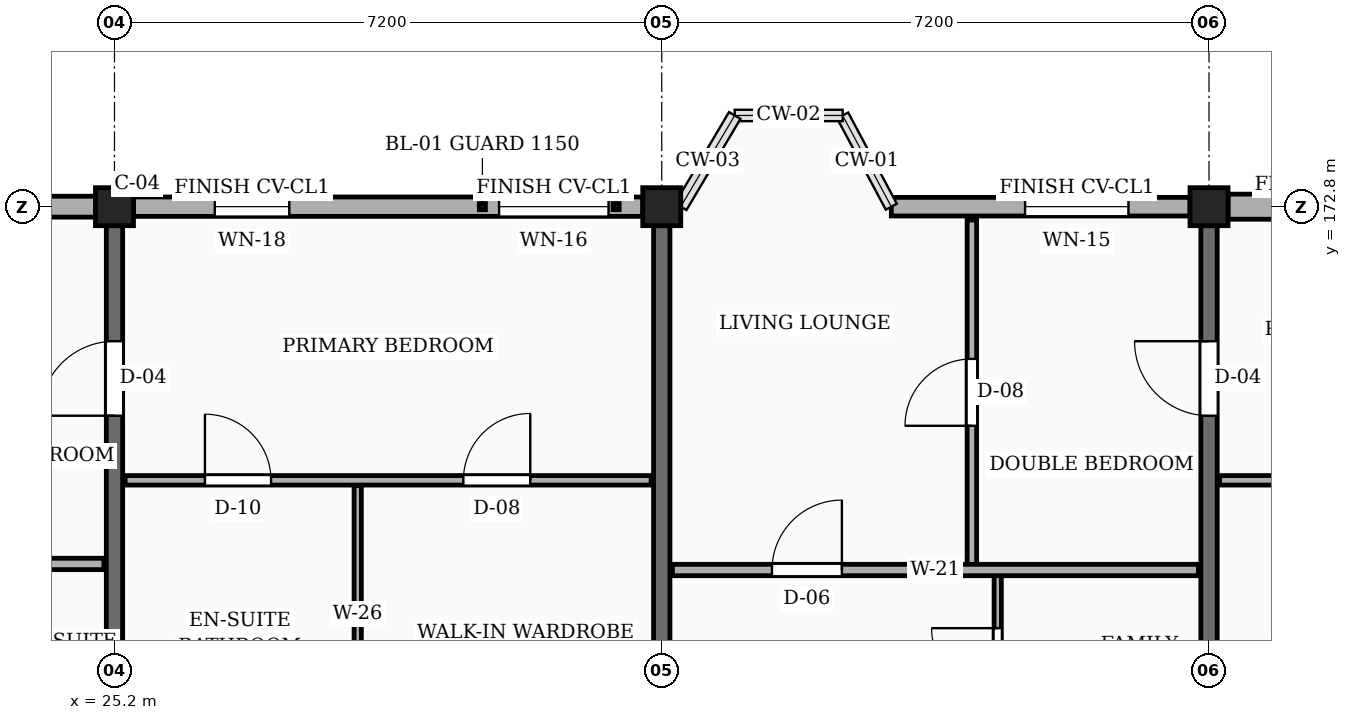
"""IFC4 building model, lengths in metres.
Left out: names, types, materials, properties, quantities, classifications, styles, units other than length and angle.
Written with IfcOpenShell. Run it as: python <this file> out.ifc"""

import sys

from ifc_helpers import new_model, si_unit, direction, frame, frame_2d, origin, origin_2d, place, context, subcontext, project, spatial, rectangle, extrude, element, fill, save


model = new_model("IFC4")
c1 = context("Model", 3, precision=1e-05, world=origin(), true_north=direction((0.0, 1.0)))
c2 = subcontext(c1, "Body", "Model", "MODEL_VIEW")
j1 = project(units=[si_unit("LENGTHUNIT", "METRE"), si_unit("PLANEANGLEUNIT", "RADIAN")], contexts=[c1])
p1 = place(None, origin())
s1 = spatial("IfcSite", under=j1, at=p1, CompositionType="ELEMENT")
p2 = place(p1, origin())
s2 = spatial("IfcBuilding", under=s1, at=p2, CompositionType="ELEMENT")
p3 = place(p2, frame((0.0, 0.0, 32.85)))
s3 = spatial("IfcBuildingStorey", under=s2, at=p3, CompositionType="ELEMENT", Elevation=32.85)
for number, where, z_axis, x_axis in (
    (1, (25.2, 172.8, 0.0), (0.0, 0.0, 1.0), (1.0, 0.0, 0.0)),
    (2, (32.4, 172.8, 0.0), (0.0, 0.0, 1.0), (1.0, 0.0, 0.0)),
    (3, (39.6, 172.8, 0.0), (0.0, 0.0, 1.0), (1.0, 0.0, 0.0)),
):
    element("IfcColumn", number, at=place(p3, frame(where, z_axis=z_axis, x_axis=x_axis)), inside=s3, PredefinedType="COLUMN", context=c2, shape_type="SweptSolid", body=[
        extrude(rectangle(XDim=0.5, YDim=0.5, at=origin_2d()), origin(), (0.0, 0.0, 1.0), 3.15),
    ])
p4 = place(p3, frame((25.2, 165.9, 0.0), z_axis=(0.0, 0.0, 1.0), x_axis=(0.0, 1.0, 0.0)))
e4 = element("IfcWall", 4, at=p4, inside=s3, PredefinedType="SOLIDWALL", context=c2, shape_type="SweptSolid", body=[
    extrude(rectangle(XDim=6.65, YDim=0.215, at=frame_2d((3.325, 0.0))), origin(), (0.0, 0.0, 1.0), 2.185),
])
p5 = place(p4, frame((4.15, 0.0, 0.0)))
e5 = element("IfcOpeningElement", 5, at=p5, cuts=e4, PredefinedType="OPENING", context=c2, shape_type="SweptSolid", body=[
    extrude(rectangle(XDim=0.98, YDim=2.12, at=frame_2d((0.49, 1.06))), frame((0.0, 0.118, 0.0), z_axis=(0.0, -1.0, 0.0), x_axis=(1.0, 0.0, 0.0)), (0.0, 0.0, 1.0), 0.235),
])
p6 = place(p3, frame((32.4, 165.9, 0.0), z_axis=(0.0, 0.0, 1.0), x_axis=(0.0, 1.0, 0.0)))
e6 = element("IfcWall", 6, at=p6, inside=s3, PredefinedType="SOLIDWALL", context=c2, shape_type="SweptSolid", body=[
    extrude(rectangle(XDim=6.65, YDim=0.215, at=frame_2d((3.325, 0.0))), origin(), (0.0, 0.0, 1.0), 2.185),
])
p7 = place(p3, frame((39.6, 165.9, 0.0), z_axis=(0.0, 0.0, 1.0), x_axis=(0.0, 1.0, 0.0)))
e7 = element("IfcWall", 7, at=p7, inside=s3, PredefinedType="SOLIDWALL", context=c2, shape_type="SweptSolid", body=[
    extrude(rectangle(XDim=6.65, YDim=0.215, at=frame_2d((3.325, 0.0))), origin(), (0.0, 0.0, 1.0), 2.185),
])
p8 = place(p7, frame((4.15, 0.0, 0.0)))
e8 = element("IfcOpeningElement", 8, at=p8, cuts=e7, PredefinedType="OPENING", context=c2, shape_type="SweptSolid", body=[
    extrude(rectangle(XDim=0.98, YDim=2.12, at=frame_2d((0.49, 1.06))), frame((0.0, 0.118, 0.0), z_axis=(0.0, -1.0, 0.0), x_axis=(1.0, 0.0, 0.0)), (0.0, 0.0, 1.0), 0.235),
])
p9 = place(p3, frame((46.55, 172.8, 0.0), z_axis=(0.0, 0.0, 1.0), x_axis=(-1.0, 0.0, 0.0)))
e9 = element("IfcWall", 9, at=p9, inside=s3, PredefinedType="SOLIDWALL", context=c2, shape_type="SweptSolid", body=[
    extrude(rectangle(XDim=6.7, YDim=0.33, at=frame_2d((3.35, 0.0))), origin(), (0.0, 0.0, 1.0), 2.455),
])
p10 = place(p9, frame((0.45, 0.0, 0.78)))
e10 = element("IfcOpeningElement", 10, at=p10, cuts=e9, PredefinedType="OPENING", context=c2, shape_type="SweptSolid", body=[
    extrude(rectangle(XDim=1.2, YDim=1.26, at=frame_2d((0.6, 0.63))), frame((0.0, 0.175, 0.0), z_axis=(0.0, -1.0, 0.0), x_axis=(1.0, 0.0, 0.0)), (0.0, 0.0, 1.0), 0.35),
])
p11 = place(p9, frame((4.65, 0.0, 0.78)))
e11 = element("IfcOpeningElement", 11, at=p11, cuts=e9, PredefinedType="OPENING", context=c2, shape_type="SweptSolid", body=[
    extrude(rectangle(XDim=1.36, YDim=1.26, at=frame_2d((0.68, 0.63))), frame((0.0, 0.175, 0.0), z_axis=(0.0, -1.0, 0.0), x_axis=(1.0, 0.0, 0.0)), (0.0, 0.0, 1.0), 0.35),
])
p12 = place(p3, frame((39.35, 172.8, 0.0), z_axis=(0.0, 0.0, 1.0), x_axis=(-1.0, 0.0, 0.0)))
e12 = element("IfcWall", 12, at=p12, inside=s3, PredefinedType="SOLIDWALL", context=c2, shape_type="SweptSolid", body=[
    extrude(rectangle(XDim=3.93, YDim=0.245, at=frame_2d((1.965, 0.0))), origin(), (0.0, 0.0, 1.0), 2.455),
])
p13 = place(p12, frame((0.81, 0.0, 0.78)))
e13 = element("IfcOpeningElement", 13, at=p13, cuts=e12, PredefinedType="OPENING", context=c2, shape_type="SweptSolid", body=[
    extrude(rectangle(XDim=1.36, YDim=1.26, at=frame_2d((0.68, 0.63))), frame((0.0, 0.133, 0.0), z_axis=(0.0, -1.0, 0.0), x_axis=(1.0, 0.0, 0.0)), (0.0, 0.0, 1.0), 0.265),
])
p14 = place(p3, frame((32.15, 172.8, 0.0), z_axis=(0.0, 0.0, 1.0), x_axis=(-1.0, 0.0, 0.0)))
e14 = element("IfcWall", 14, at=p14, inside=s3, PredefinedType="SOLIDWALL", context=c2, shape_type="SweptSolid", body=[
    extrude(rectangle(XDim=6.7, YDim=0.255, at=frame_2d((3.35, 0.0))), origin(), (0.0, 0.0, 1.0), 2.455),
])
p15 = place(p14, frame((0.45, 0.0, 0.78)))
e15 = element("IfcOpeningElement", 15, at=p15, cuts=e14, PredefinedType="OPENING", context=c2, shape_type="SweptSolid", body=[
    extrude(rectangle(XDim=1.44, YDim=1.26, at=frame_2d((0.72, 0.63))), frame((0.0, 0.137, 0.0), z_axis=(0.0, -1.0, 0.0), x_axis=(1.0, 0.0, 0.0)), (0.0, 0.0, 1.0), 0.275),
])
p16 = place(p14, frame((4.65, 0.0, 0.78)))
e16 = element("IfcOpeningElement", 16, at=p16, cuts=e14, PredefinedType="OPENING", context=c2, shape_type="SweptSolid", body=[
    extrude(rectangle(XDim=0.98, YDim=1.36, at=frame_2d((0.49, 0.68))), frame((0.0, 0.137, 0.0), z_axis=(0.0, -1.0, 0.0), x_axis=(1.0, 0.0, 0.0)), (0.0, 0.0, 1.0), 0.275),
])
p17 = place(p3, frame((24.95, 172.8, 0.0), z_axis=(0.0, 0.0, 1.0), x_axis=(-1.0, 0.0, 0.0)))
e17 = element("IfcWall", 17, at=p17, inside=s3, PredefinedType="SOLIDWALL", context=c2, shape_type="SweptSolid", body=[
    extrude(rectangle(XDim=3.93, YDim=0.275, at=frame_2d((1.965, 0.0))), origin(), (0.0, 0.0, 1.0), 2.455),
])
p18 = place(p17, frame((1.14, 0.0, 0.78)))
e18 = element("IfcOpeningElement", 18, at=p18, cuts=e17, PredefinedType="OPENING", context=c2, shape_type="SweptSolid", body=[
    extrude(rectangle(XDim=0.98, YDim=1.36, at=frame_2d((0.49, 0.68))), frame((0.0, 0.147, 0.0), z_axis=(0.0, -1.0, 0.0), x_axis=(1.0, 0.0, 0.0)), (0.0, 0.0, 1.0), 0.295),
])
p19 = place(p3, frame((18.14, 168.1, 0.0), z_axis=(0.0, 0.0, 1.0), x_axis=(1.0, 0.0, 0.0)))
e19 = element("IfcWall", 19, at=p19, inside=s3, PredefinedType="PARTITIONING", context=c2, shape_type="SweptSolid", body=[
    extrude(rectangle(XDim=6.92, YDim=0.15, at=frame_2d((3.46, 0.0))), origin(), (0.0, 0.0, 1.0), 2.32),
])
p20 = place(p19, frame((1.31, 0.0, 0.0)))
e20 = element("IfcOpeningElement", 20, at=p20, cuts=e19, PredefinedType="OPENING", context=c2, shape_type="SweptSolid", body=[
    extrude(rectangle(XDim=0.95, YDim=2.1, at=frame_2d((0.475, 1.05))), frame((0.0, 0.085, 0.0), z_axis=(0.0, -1.0, 0.0), x_axis=(1.0, 0.0, 0.0)), (0.0, 0.0, 1.0), 0.17),
])
p21 = place(p3, frame((25.34, 169.2, 0.0), z_axis=(0.0, 0.0, 1.0), x_axis=(1.0, 0.0, 0.0)))
e21 = element("IfcWall", 21, at=p21, inside=s3, PredefinedType="PARTITIONING", context=c2, shape_type="SweptSolid", body=[
    extrude(rectangle(XDim=6.92, YDim=0.125, at=frame_2d((3.46, 0.0))), origin(), (0.0, 0.0, 1.0), 2.32),
])
p22 = place(p21, frame((1.05, 0.0, 0.0)))
e22 = element("IfcOpeningElement", 22, at=p22, cuts=e21, PredefinedType="OPENING", context=c2, shape_type="SweptSolid", body=[
    extrude(rectangle(XDim=0.87, YDim=2.05, at=frame_2d((0.435, 1.025))), frame((0.0, 0.073, 0.0), z_axis=(0.0, -1.0, 0.0), x_axis=(1.0, 0.0, 0.0)), (0.0, 0.0, 1.0), 0.145),
])
p23 = place(p21, frame((4.45, 0.0, 0.0)))
e23 = element("IfcOpeningElement", 23, at=p23, cuts=e21, PredefinedType="OPENING", context=c2, shape_type="SweptSolid", body=[
    extrude(rectangle(XDim=0.88, YDim=2.08, at=frame_2d((0.44, 1.04))), frame((0.0, 0.073, 0.0), z_axis=(0.0, -1.0, 0.0), x_axis=(1.0, 0.0, 0.0)), (0.0, 0.0, 1.0), 0.145),
])
p24 = place(p3, frame((28.4, 165.74, 0.0), z_axis=(0.0, 0.0, 1.0), x_axis=(0.0, 1.0, 0.0)))
e24 = element("IfcWall", 24, at=p24, inside=s3, PredefinedType="PARTITIONING", context=c2, shape_type="SweptSolid", body=[
    extrude(rectangle(XDim=3.39, YDim=0.095, at=frame_2d((1.695, 0.0))), origin(), (0.0, 0.0, 1.0), 2.32),
])
p25 = place(p3, frame((36.48, 168.09, 0.0), z_axis=(0.0, 0.0, 1.0), x_axis=(0.0, 1.0, 0.0)))
e25 = element("IfcWall", 25, at=p25, inside=s3, PredefinedType="PARTITIONING", context=c2, shape_type="SweptSolid", body=[
    extrude(rectangle(XDim=4.535, YDim=0.125, at=frame_2d((2.268, 0.0))), origin(), (0.0, 0.0, 1.0), 2.32),
])
p26 = place(p25, frame((1.827, 0.0, 0.0)))
e26 = element("IfcOpeningElement", 26, at=p26, cuts=e25, PredefinedType="OPENING", context=c2, shape_type="SweptSolid", body=[
    extrude(rectangle(XDim=0.88, YDim=2.08, at=frame_2d((0.44, 1.04))), frame((0.0, 0.073, 0.0), z_axis=(0.0, -1.0, 0.0), x_axis=(1.0, 0.0, 0.0)), (0.0, 0.0, 1.0), 0.145),
])
p27 = place(p3, frame((36.82, 165.69, 0.0), z_axis=(0.0, 0.0, 1.0), x_axis=(0.0, 1.0, 0.0)))
e27 = element("IfcWall", 27, at=p27, inside=s3, PredefinedType="PARTITIONING", context=c2, shape_type="SweptSolid", body=[
    extrude(rectangle(XDim=2.26, YDim=0.095, at=frame_2d((1.13, 0.0))), origin(), (0.0, 0.0, 1.0), 2.32),
])
p28 = place(p27, frame((0.695, 0.0, 0.0)))
e28 = element("IfcOpeningElement", 28, at=p28, cuts=e27, PredefinedType="OPENING", context=c2, shape_type="SweptSolid", body=[
    extrude(rectangle(XDim=0.87, YDim=2.05, at=frame_2d((0.435, 1.025))), frame((0.0, 0.058, 0.0), z_axis=(0.0, -1.0, 0.0), x_axis=(1.0, 0.0, 0.0)), (0.0, 0.0, 1.0), 0.115),
])
p29 = place(p3, frame((32.54, 168.02, 0.0), z_axis=(0.0, 0.0, 1.0), x_axis=(1.0, 0.0, 0.0)))
e29 = element("IfcWall", 29, at=p29, inside=s3, PredefinedType="PARTITIONING", context=c2, shape_type="SweptSolid", body=[
    extrude(rectangle(XDim=6.92, YDim=0.15, at=frame_2d((3.46, 0.0))), origin(), (0.0, 0.0, 1.0), 2.32),
])
p30 = place(p29, frame((1.31, 0.0, 0.0)))
e30 = element("IfcOpeningElement", 30, at=p30, cuts=e29, PredefinedType="OPENING", context=c2, shape_type="SweptSolid", body=[
    extrude(rectangle(XDim=0.92, YDim=2.1, at=frame_2d((0.46, 1.05))), frame((0.0, 0.085, 0.0), z_axis=(0.0, -1.0, 0.0), x_axis=(1.0, 0.0, 0.0)), (0.0, 0.0, 1.0), 0.17),
])
p31 = place(p3, frame((39.74, 169.2, 0.0), z_axis=(0.0, 0.0, 1.0), x_axis=(1.0, 0.0, 0.0)))
e31 = element("IfcWall", 31, at=p31, inside=s3, PredefinedType="PARTITIONING", context=c2, shape_type="SweptSolid", body=[
    extrude(rectangle(XDim=6.92, YDim=0.125, at=frame_2d((3.46, 0.0))), origin(), (0.0, 0.0, 1.0), 2.32),
])
p32 = place(p31, frame((1.05, 0.0, 0.0)))
e32 = element("IfcOpeningElement", 32, at=p32, cuts=e31, PredefinedType="OPENING", context=c2, shape_type="SweptSolid", body=[
    extrude(rectangle(XDim=0.87, YDim=2.05, at=frame_2d((0.435, 1.025))), frame((0.0, 0.073, 0.0), z_axis=(0.0, -1.0, 0.0), x_axis=(1.0, 0.0, 0.0)), (0.0, 0.0, 1.0), 0.145),
])
p33 = place(p31, frame((4.45, 0.0, 0.0)))
e33 = element("IfcOpeningElement", 33, at=p33, cuts=e31, PredefinedType="OPENING", context=c2, shape_type="SweptSolid", body=[
    extrude(rectangle(XDim=0.88, YDim=2.08, at=frame_2d((0.44, 1.04))), frame((0.0, 0.073, 0.0), z_axis=(0.0, -1.0, 0.0), x_axis=(1.0, 0.0, 0.0)), (0.0, 0.0, 1.0), 0.145),
])
p34 = place(p13, origin())
e34 = element("IfcWindow", 34, at=p34, inside=s3, PartitioningType="SINGLE_PANEL", PredefinedType="WINDOW", context=c2, shape_type="SweptSolid", body=[
    extrude(rectangle(XDim=1.36, YDim=1.26, at=frame_2d((0.68, 0.63))), frame((0.0, 0.03, 0.0), z_axis=(0.0, -1.0, 0.0), x_axis=(1.0, 0.0, 0.0)), (0.0, 0.0, 1.0), 0.06),
])
fill(e13, e34)
p35 = place(p15, origin())
e35 = element("IfcWindow", 35, at=p35, inside=s3, PartitioningType="SINGLE_PANEL", PredefinedType="WINDOW", context=c2, shape_type="SweptSolid", body=[
    extrude(rectangle(XDim=1.44, YDim=1.26, at=frame_2d((0.72, 0.63))), frame((0.0, 0.03, 0.0), z_axis=(0.0, -1.0, 0.0), x_axis=(1.0, 0.0, 0.0)), (0.0, 0.0, 1.0), 0.06),
])
fill(e15, e35)
p36 = place(p16, origin())
e36 = element("IfcWindow", 36, at=p36, inside=s3, PartitioningType="SINGLE_PANEL", PredefinedType="WINDOW", context=c2, shape_type="SweptSolid", body=[
    extrude(rectangle(XDim=0.98, YDim=1.36, at=frame_2d((0.49, 0.68))), frame((0.0, 0.03, 0.0), z_axis=(0.0, -1.0, 0.0), x_axis=(1.0, 0.0, 0.0)), (0.0, 0.0, 1.0), 0.06),
])
fill(e16, e36)
p37 = place(p22, origin())
e37 = element("IfcDoor", 37, at=p37, inside=s3, OperationType="SINGLE_SWING_LEFT", PredefinedType="DOOR", context=c2, shape_type="SweptSolid", body=[
    extrude(rectangle(XDim=0.87, YDim=2.05, at=frame_2d((0.435, 1.025))), frame((0.0, 0.025, 0.0), z_axis=(0.0, -1.0, 0.0), x_axis=(1.0, 0.0, 0.0)), (0.0, 0.0, 1.0), 0.05),
])
fill(e22, e37)
p38 = place(p23, origin())
e38 = element("IfcDoor", 38, at=p38, inside=s3, OperationType="SINGLE_SWING_RIGHT", PredefinedType="DOOR", context=c2, shape_type="SweptSolid", body=[
    extrude(rectangle(XDim=0.88, YDim=2.08, at=frame_2d((0.44, 1.04))), frame((0.0, 0.025, 0.0), z_axis=(0.0, -1.0, 0.0), x_axis=(1.0, 0.0, 0.0)), (0.0, 0.0, 1.0), 0.05),
])
fill(e23, e38)
p39 = place(p26, origin())
e39 = element("IfcDoor", 39, at=p39, inside=s3, OperationType="SINGLE_SWING_LEFT", PredefinedType="DOOR", context=c2, shape_type="SweptSolid", body=[
    extrude(rectangle(XDim=0.88, YDim=2.08, at=frame_2d((0.44, 1.04))), frame((0.0, 0.025, 0.0), z_axis=(0.0, -1.0, 0.0), x_axis=(1.0, 0.0, 0.0)), (0.0, 0.0, 1.0), 0.05),
])
fill(e26, e39)
p40 = place(p28, origin())
e40 = element("IfcDoor", 40, at=p40, inside=s3, OperationType="SINGLE_SWING_RIGHT", PredefinedType="DOOR", context=c2, shape_type="SweptSolid", body=[
    extrude(rectangle(XDim=0.87, YDim=2.05, at=frame_2d((0.435, 1.025))), frame((0.0, 0.025, 0.0), z_axis=(0.0, -1.0, 0.0), x_axis=(1.0, 0.0, 0.0)), (0.0, 0.0, 1.0), 0.05),
])
fill(e28, e40)
p41 = place(p30, origin())
e41 = element("IfcDoor", 41, at=p41, inside=s3, OperationType="SINGLE_SWING_RIGHT", PredefinedType="DOOR", context=c2, shape_type="SweptSolid", body=[
    extrude(rectangle(XDim=0.92, YDim=2.1, at=frame_2d((0.46, 1.05))), frame((0.0, 0.025, 0.0), z_axis=(0.0, -1.0, 0.0), x_axis=(1.0, 0.0, 0.0)), (0.0, 0.0, 1.0), 0.05),
])
fill(e30, e41)
p42 = place(p5, origin())
e42 = element("IfcDoor", 42, at=p42, inside=s3, OperationType="SINGLE_SWING_LEFT", PredefinedType="DOOR", context=c2, shape_type="SweptSolid", body=[
    extrude(rectangle(XDim=0.98, YDim=2.12, at=frame_2d((0.49, 1.06))), frame((0.0, 0.025, 0.0), z_axis=(0.0, -1.0, 0.0), x_axis=(1.0, 0.0, 0.0)), (0.0, 0.0, 1.0), 0.05),
])
fill(e5, e42)
p43 = place(p8, origin())
e43 = element("IfcDoor", 43, at=p43, inside=s3, OperationType="SINGLE_SWING_RIGHT", PredefinedType="DOOR", context=c2, shape_type="SweptSolid", body=[
    extrude(rectangle(XDim=0.98, YDim=2.12, at=frame_2d((0.49, 1.06))), frame((0.0, 0.025, 0.0), z_axis=(0.0, -1.0, 0.0), x_axis=(1.0, 0.0, 0.0)), (0.0, 0.0, 1.0), 0.05),
])
fill(e8, e43)
save(model, sys.argv[1])
